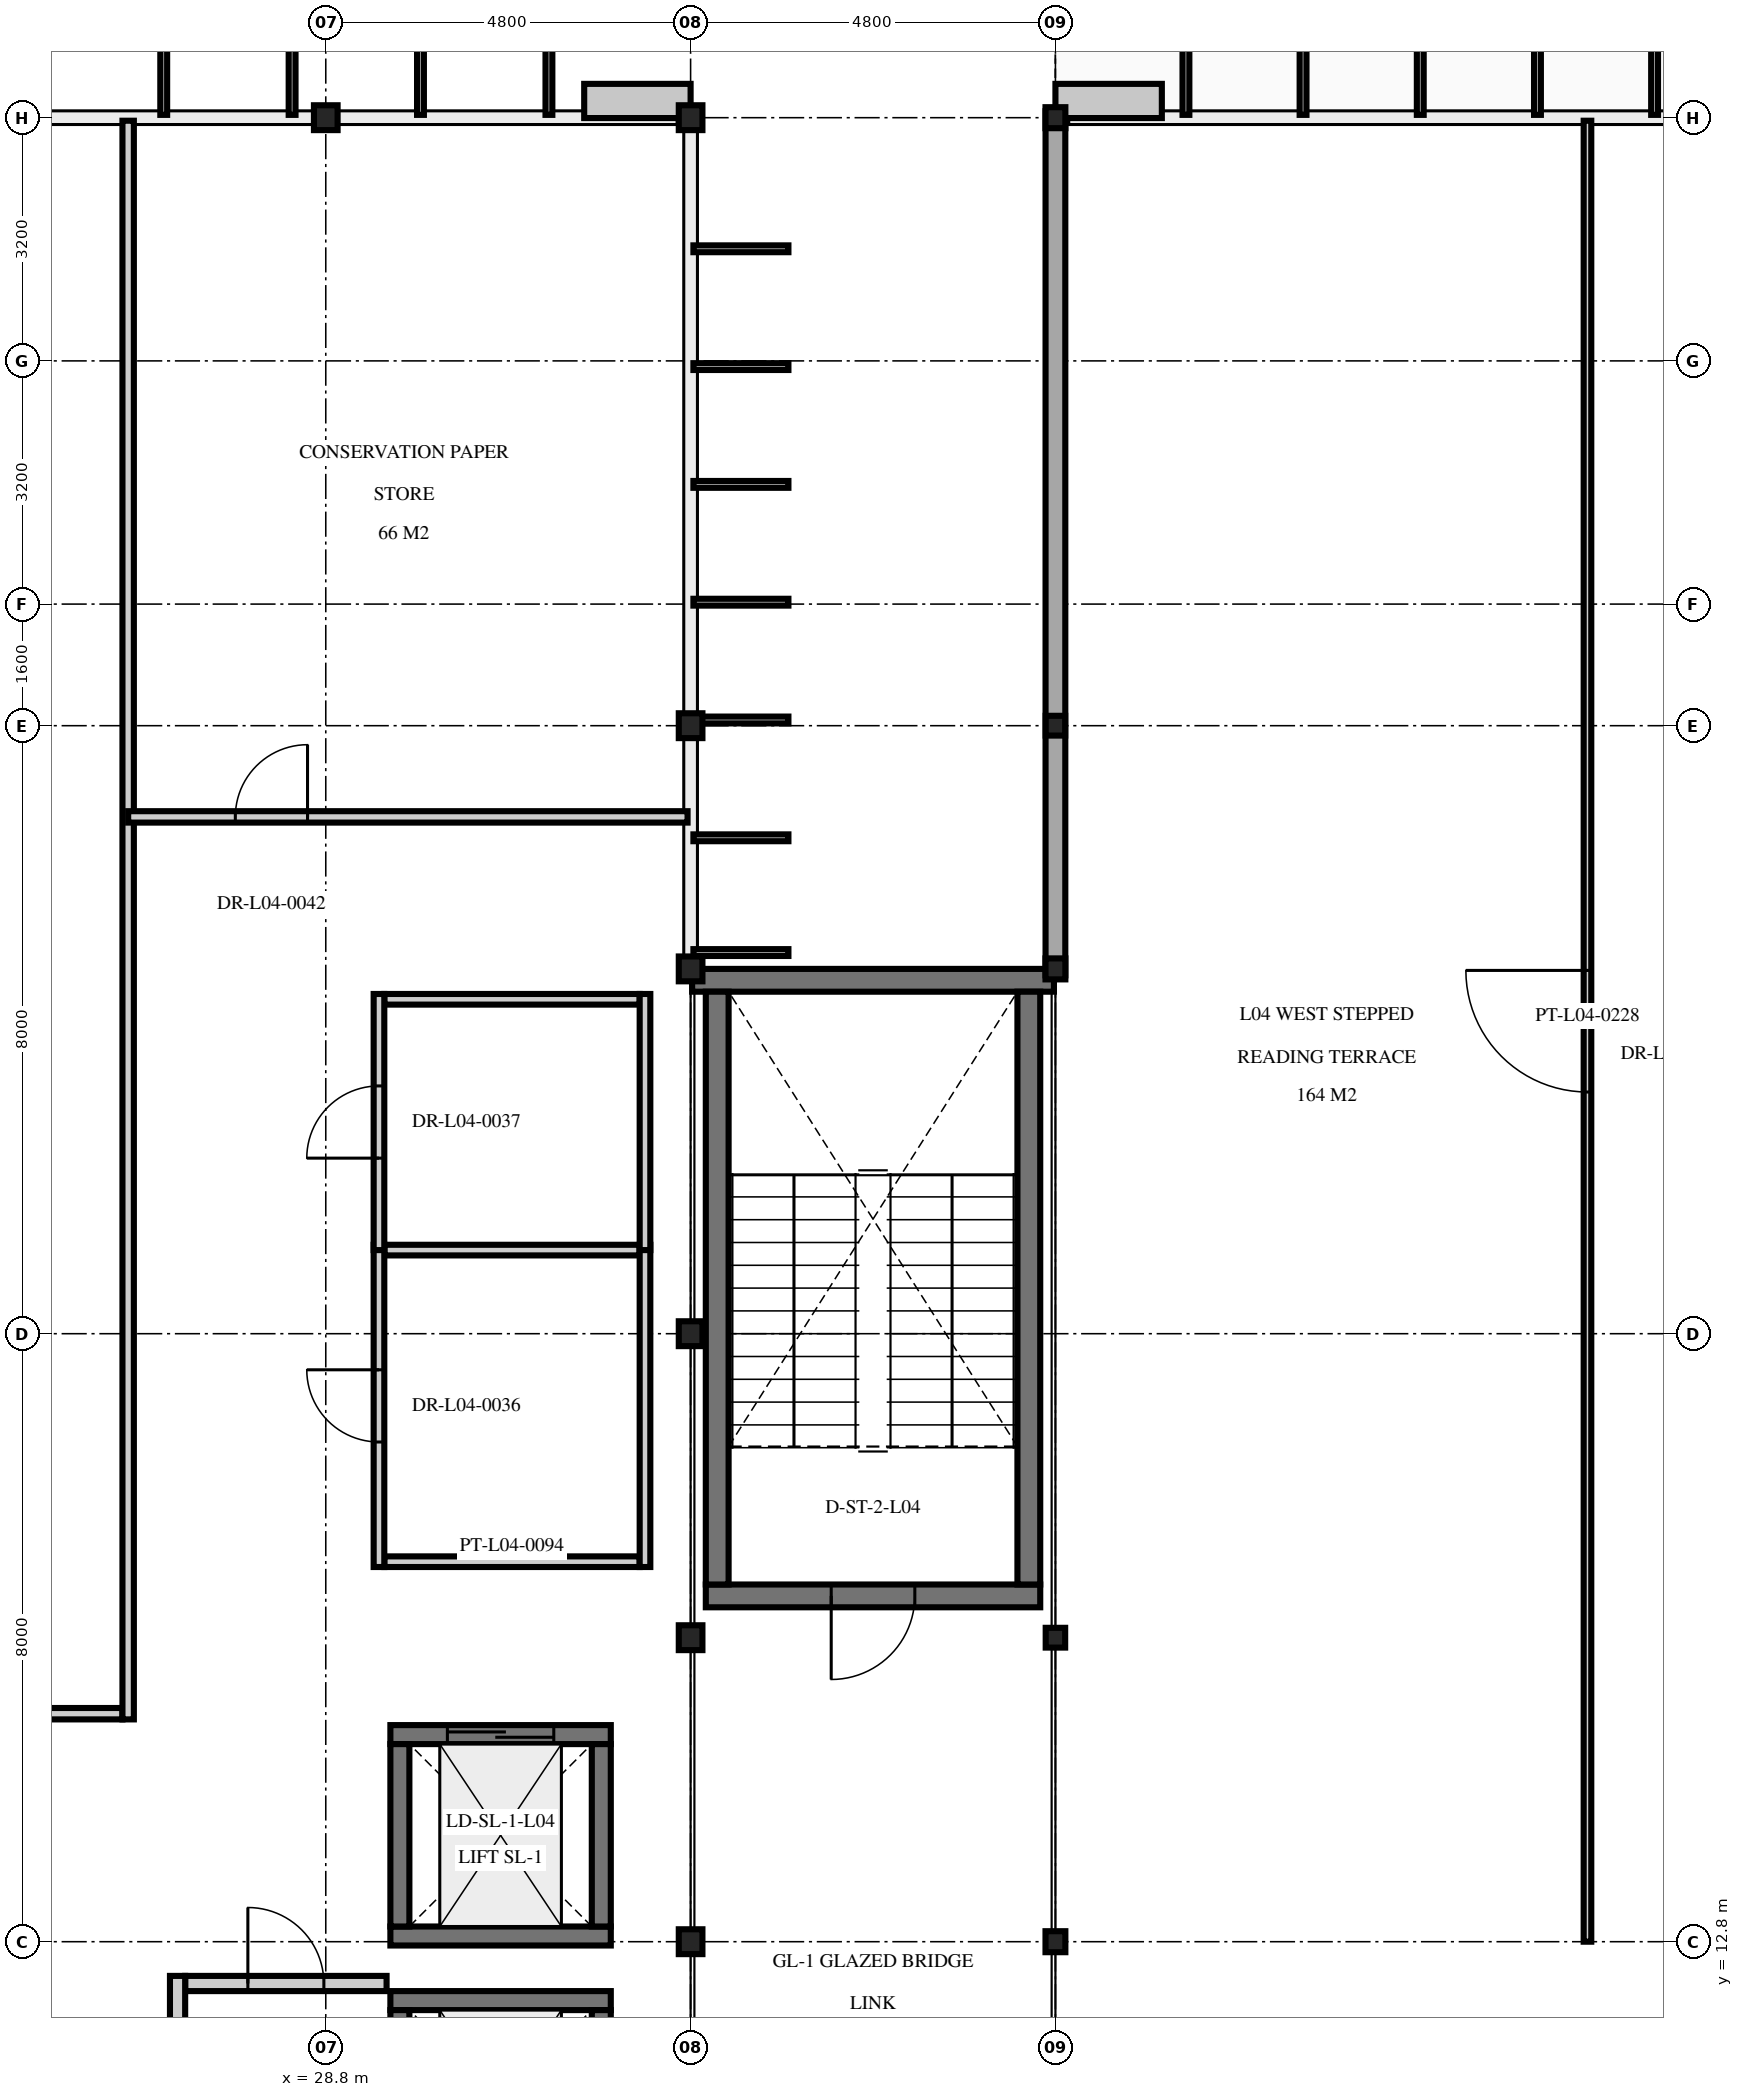
"""IFC4 building model, lengths in metres.
Left out: names, types, materials, properties, quantities, classifications, styles, units other than length and angle.
Written with IfcOpenShell. Run it as: python <this file> out.ifc"""

import sys

from ifc_helpers import new_model, si_unit, direction, frame, frame_2d, origin, origin_2d, place, context, subcontext, project, spatial, rectangle, i_section, extrude, element, fill, save


model = new_model("IFC4")
c1 = context("Model", 3, precision=1e-05, world=origin(), true_north=direction((0.0, 1.0)))
c2 = subcontext(c1, "Body", "Model", "MODEL_VIEW")
j1 = project(units=[si_unit("LENGTHUNIT", "METRE"), si_unit("PLANEANGLEUNIT", "RADIAN")], contexts=[c1])
p1 = place(None, origin())
s1 = spatial("IfcSite", under=j1, at=p1, CompositionType="ELEMENT")
p2 = place(p1, origin())
s2 = spatial("IfcBuilding", under=s1, at=p2, CompositionType="ELEMENT")
p3 = place(p2, frame((0.0, 0.0, 18.6)))
s3 = spatial("IfcBuildingStorey", under=s2, at=p3, CompositionType="ELEMENT", Elevation=18.6)
for number, where, z_axis, x_axis in (
    (1, (28.8, 36.8, 0.0), (0.0, 0.0, 1.0), (1.0, 0.0, 0.0)),
    (2, (33.6, 36.8, 0.0), (0.0, 0.0, 1.0), (1.0, 0.0, 0.0)),
    (3, (33.6, 12.8, 0.0), (0.0, 0.0, 1.0), (1.0, 0.0, 0.0)),
    (4, (33.6, 16.8, 0.0), (0.0, 0.0, 1.0), (1.0, 0.0, 0.0)),
    (5, (33.6, 20.8, 0.0), (0.0, 0.0, 1.0), (1.0, 0.0, 0.0)),
    (6, (33.6, 25.6, 0.0), (0.0, 0.0, 1.0), (1.0, 0.0, 0.0)),
    (7, (33.6, 28.8, 0.0), (0.0, 0.0, 1.0), (1.0, 0.0, 0.0)),
):
    element("IfcColumn", number, at=place(p3, frame(where, z_axis=z_axis, x_axis=x_axis)), inside=s3, PredefinedType="COLUMN", context=c2, shape_type="SweptSolid", body=[
        extrude(i_section(OverallWidth=0.311, OverallDepth=0.327, WebThickness=0.016, FlangeThickness=0.025, at=origin_2d()), origin(), (0.0, 0.0, 1.0), 4.5),
    ])
for number, where, z_axis, x_axis in (
    (8, (38.4, 12.8, 0.0), (0.0, 0.0, 1.0), (1.0, 0.0, 0.0)),
    (9, (38.4, 25.6, 0.0), (0.0, 0.0, 1.0), (1.0, 0.0, 0.0)),
    (10, (38.4, 36.8, 0.0), (0.0, 0.0, 1.0), (1.0, 0.0, 0.0)),
):
    element("IfcColumn", number, at=place(p3, frame(where, z_axis=z_axis, x_axis=x_axis)), inside=s3, PredefinedType="COLUMN", context=c2, shape_type="SweptSolid", body=[
        extrude(i_section(OverallWidth=0.261, OverallDepth=0.276, WebThickness=0.015, FlangeThickness=0.025, at=origin_2d()), origin(), (0.0, 0.0, 1.0), 4.5),
    ])
for number, where, z_axis, x_axis in (
    (11, (38.4, 28.8, 0.0), (0.0, 0.0, 1.0), (1.0, 0.0, 0.0)),
    (12, (38.4, 16.8, 0.0), (0.0, 0.0, 1.0), (1.0, 0.0, 0.0)),
):
    element("IfcColumn", number, at=place(p3, frame(where, z_axis=z_axis, x_axis=x_axis)), inside=s3, PredefinedType="COLUMN", context=c2, shape_type="SweptSolid", body=[
        extrude(i_section(OverallWidth=0.256, OverallDepth=0.26, WebThickness=0.01, FlangeThickness=0.017, at=origin_2d()), origin(), (0.0, 0.0, 1.0), 4.5),
    ])
p4 = place(p3, frame((38.2, 17.35, 0.0), z_axis=(0.0, 0.0, 1.0), x_axis=(-1.0, 0.0, 0.0)))
e13 = element("IfcWall", 13, at=p4, inside=s3, PredefinedType="SHEAR", context=c2, shape_type="SweptSolid", body=[
    extrude(rectangle(XDim=4.4, YDim=0.3, at=frame_2d((2.2, 0.0))), origin(), (0.0, 0.0, 1.0), 4.28),
])
p5 = place(p4, frame((1.65, 0.0, 0.0)))
e14 = element("IfcOpeningElement", 14, at=p5, cuts=e13, PredefinedType="OPENING", context=c2, shape_type="SweptSolid", body=[
    extrude(rectangle(XDim=1.1, YDim=2.2, at=frame_2d((0.55, 1.1))), frame((0.0, 0.16, 0.0), z_axis=(0.0, -1.0, 0.0), x_axis=(1.0, 0.0, 0.0)), (0.0, 0.0, 1.0), 0.32),
])
p6 = place(p3, frame((33.62, 25.45, 0.0), z_axis=(0.0, 0.0, 1.0), x_axis=(1.0, 0.0, 0.0)))
e15 = element("IfcWall", 15, at=p6, inside=s3, PredefinedType="SHEAR", context=c2, shape_type="SweptSolid", body=[
    extrude(rectangle(XDim=4.76, YDim=0.3, at=frame_2d((2.38, 0.0))), origin(), (0.0, 0.0, 1.0), 4.28),
])
for number, where, z_axis, x_axis in (
    (16, (33.95, 17.5, 0.0), (0.0, 0.0, 1.0), (0.0, 1.0, 0.0)),
    (17, (38.05, 25.3, 0.0), (0.0, 0.0, 1.0), (0.0, -1.0, 0.0)),
):
    element("IfcWall", number, at=place(p3, frame(where, z_axis=z_axis, x_axis=x_axis)), inside=s3, PredefinedType="SHEAR", context=c2, shape_type="SweptSolid", body=[
        extrude(rectangle(XDim=7.8, YDim=0.3, at=frame_2d((3.9, 0.0))), origin(), (0.0, 0.0, 1.0), 4.28),
    ])
p7 = place(p3, frame((29.65, 12.025, 0.0), z_axis=(0.0, 0.0, 1.0), x_axis=(1.0, 0.0, 0.0)))
e18 = element("IfcWall", 18, at=p7, inside=s3, PredefinedType="SHEAR", context=c2, shape_type="SweptSolid", body=[
    extrude(rectangle(XDim=2.9, YDim=0.25, at=frame_2d((1.45, 0.0))), origin(), (0.0, 0.0, 1.0), 4.28),
])
p8 = place(p3, frame((29.775, 9.5, 0.0), z_axis=(0.0, 0.0, 1.0), x_axis=(0.0, 1.0, 0.0)))
e19 = element("IfcWall", 19, at=p8, inside=s3, PredefinedType="SHEAR", context=c2, shape_type="SweptSolid", body=[
    extrude(rectangle(XDim=2.4, YDim=0.25, at=frame_2d((1.2, 0.0))), origin(), (0.0, 0.0, 1.0), 4.28),
])
p9 = place(p8, frame((0.5, 0.0, 0.0)))
e20 = element("IfcOpeningElement", 20, at=p9, cuts=e19, PredefinedType="OPENING", context=c2, shape_type="SweptSolid", body=[
    extrude(rectangle(XDim=1.4, YDim=2.2, at=frame_2d((0.7, 1.1))), frame((0.0, 0.135, 0.0), z_axis=(0.0, -1.0, 0.0), x_axis=(1.0, 0.0, 0.0)), (0.0, 0.0, 1.0), 0.27),
])
p10 = place(p3, frame((32.425, 11.9, 0.0), z_axis=(0.0, 0.0, 1.0), x_axis=(0.0, -1.0, 0.0)))
e21 = element("IfcWall", 21, at=p10, inside=s3, PredefinedType="SHEAR", context=c2, shape_type="SweptSolid", body=[
    extrude(rectangle(XDim=2.4, YDim=0.25, at=frame_2d((1.2, 0.0))), origin(), (0.0, 0.0, 1.0), 4.28),
])
p11 = place(p3, frame((32.55, 12.875, 0.0), z_axis=(0.0, 0.0, 1.0), x_axis=(-1.0, 0.0, 0.0)))
e22 = element("IfcWall", 22, at=p11, inside=s3, PredefinedType="SHEAR", context=c2, shape_type="SweptSolid", body=[
    extrude(rectangle(XDim=2.9, YDim=0.25, at=frame_2d((1.45, 0.0))), origin(), (0.0, 0.0, 1.0), 4.28),
])
p12 = place(p3, frame((29.65, 15.525, 0.0), z_axis=(0.0, 0.0, 1.0), x_axis=(1.0, 0.0, 0.0)))
e23 = element("IfcWall", 23, at=p12, inside=s3, PredefinedType="SHEAR", context=c2, shape_type="SweptSolid", body=[
    extrude(rectangle(XDim=2.9, YDim=0.25, at=frame_2d((1.45, 0.0))), origin(), (0.0, 0.0, 1.0), 4.28),
])
p13 = place(p12, frame((0.75, 0.0, 0.0)))
e24 = element("IfcOpeningElement", 24, at=p13, cuts=e23, PredefinedType="OPENING", context=c2, shape_type="SweptSolid", body=[
    extrude(rectangle(XDim=1.4, YDim=2.2, at=frame_2d((0.7, 1.1))), frame((0.0, 0.135, 0.0), z_axis=(0.0, -1.0, 0.0), x_axis=(1.0, 0.0, 0.0)), (0.0, 0.0, 1.0), 0.27),
])
for number, where, z_axis, x_axis in (
    (25, (29.775, 13.0, 0.0), (0.0, 0.0, 1.0), (0.0, 1.0, 0.0)),
    (26, (32.425, 15.4, 0.0), (0.0, 0.0, 1.0), (0.0, -1.0, 0.0)),
):
    element("IfcWall", number, at=place(p3, frame(where, z_axis=z_axis, x_axis=x_axis)), inside=s3, PredefinedType="SHEAR", context=c2, shape_type="SweptSolid", body=[
        extrude(rectangle(XDim=2.4, YDim=0.25, at=frame_2d((1.2, 0.0))), origin(), (0.0, 0.0, 1.0), 4.28),
    ])
p14 = place(p3, frame((38.4, 25.515, 0.0), z_axis=(0.0, 0.0, 1.0), x_axis=(0.0, 1.0, 0.0)))
e27 = element("IfcWall", 27, at=p14, inside=s3, PredefinedType="SOLIDWALL", context=c2, shape_type="SweptSolid", body=[
    extrude(rectangle(XDim=11.37, YDim=0.26, at=frame_2d((5.685, 0.0))), origin(), (0.0, 0.0, 1.0), 3.855),
])
p15 = place(p3, frame((26.95, 12.25, 0.0), z_axis=(0.0, 0.0, 1.0), x_axis=(1.0, 0.0, 0.0)))
e28 = element("IfcWall", 28, at=p15, inside=s3, PredefinedType="PARTITIONING", context=c2, shape_type="SweptSolid", body=[
    extrude(rectangle(XDim=2.65, YDim=0.2, at=frame_2d((1.325, 0.0))), origin(), (0.0, 0.0, 1.0), 4.28),
])
p16 = place(p15, frame((0.825, 0.0, 0.0)))
e29 = element("IfcOpeningElement", 29, at=p16, cuts=e28, PredefinedType="OPENING", context=c2, shape_type="SweptSolid", body=[
    extrude(rectangle(XDim=1.0, YDim=2.2, at=frame_2d((0.5, 1.1))), frame((0.0, 0.11, 0.0), z_axis=(0.0, -1.0, 0.0), x_axis=(1.0, 0.0, 0.0)), (0.0, 0.0, 1.0), 0.22),
])
p17 = place(p3, frame((26.85, 9.25, 0.0), z_axis=(0.0, 0.0, 1.0), x_axis=(0.0, 1.0, 0.0)))
e30 = element("IfcWall", 30, at=p17, inside=s3, PredefinedType="PARTITIONING", context=c2, shape_type="SweptSolid", body=[
    extrude(rectangle(XDim=3.1, YDim=0.2, at=frame_2d((1.55, 0.0))), origin(), (0.0, 0.0, 1.0), 4.28),
])
for number, where, z_axis, x_axis in (
    (31, (29.57, 17.8, 0.0), (0.0, 0.0, 1.0), (1.0, 0.0, 0.0)),
    (32, (29.57, 21.9, 0.0), (0.0, 0.0, 1.0), (1.0, 0.0, 0.0)),
):
    element("IfcWall", number, at=place(p3, frame(where, z_axis=z_axis, x_axis=x_axis)), inside=s3, PredefinedType="PARTITIONING", context=c2, shape_type="SweptSolid", body=[
        extrude(rectangle(XDim=3.36, YDim=0.14, at=frame_2d((1.68, 0.0))), origin(), (0.0, 0.0, 1.0), 4.015),
    ])
p18 = place(p3, frame((29.5, 17.73, 0.0), z_axis=(0.0, 0.0, 1.0), x_axis=(0.0, 1.0, 0.0)))
e33 = element("IfcWall", 33, at=p18, inside=s3, PredefinedType="PARTITIONING", context=c2, shape_type="SweptSolid", body=[
    extrude(rectangle(XDim=4.24, YDim=0.14, at=frame_2d((2.12, 0.0))), origin(), (0.0, 0.0, 1.0), 3.665),
])
p19 = place(p18, frame((1.645, 0.0, 0.0)))
e34 = element("IfcOpeningElement", 34, at=p19, cuts=e33, PredefinedType="OPENING", context=c2, shape_type="SweptSolid", body=[
    extrude(rectangle(XDim=0.95, YDim=2.1, at=frame_2d((0.475, 1.05))), frame((0.0, 0.08, 0.0), z_axis=(0.0, -1.0, 0.0), x_axis=(1.0, 0.0, 0.0)), (0.0, 0.0, 1.0), 0.16),
])
p20 = place(p3, frame((33.0, 17.73, 0.0), z_axis=(0.0, 0.0, 1.0), x_axis=(0.0, 1.0, 0.0)))
e35 = element("IfcWall", 35, at=p20, inside=s3, PredefinedType="PARTITIONING", context=c2, shape_type="SweptSolid", body=[
    extrude(rectangle(XDim=4.24, YDim=0.14, at=frame_2d((2.12, 0.0))), origin(), (0.0, 0.0, 1.0), 3.665),
])
p21 = place(p3, frame((29.57, 25.2, 0.0), z_axis=(0.0, 0.0, 1.0), x_axis=(1.0, 0.0, 0.0)))
e36 = element("IfcWall", 36, at=p21, inside=s3, PredefinedType="PARTITIONING", context=c2, shape_type="SweptSolid", body=[
    extrude(rectangle(XDim=3.36, YDim=0.14, at=frame_2d((1.68, 0.0))), origin(), (0.0, 0.0, 1.0), 4.015),
])
p22 = place(p3, frame((29.5, 21.9, 0.0), z_axis=(0.0, 0.0, 1.0), x_axis=(0.0, 1.0, 0.0)))
e37 = element("IfcWall", 37, at=p22, inside=s3, PredefinedType="PARTITIONING", context=c2, shape_type="SweptSolid", body=[
    extrude(rectangle(XDim=3.37, YDim=0.14, at=frame_2d((1.685, 0.0))), origin(), (0.0, 0.0, 1.0), 4.28),
])
p23 = place(p22, frame((1.21, 0.0, 0.0)))
e38 = element("IfcOpeningElement", 38, at=p23, cuts=e37, PredefinedType="OPENING", context=c2, shape_type="SweptSolid", body=[
    extrude(rectangle(XDim=0.95, YDim=2.1, at=frame_2d((0.475, 1.05))), frame((0.0, 0.08, 0.0), z_axis=(0.0, -1.0, 0.0), x_axis=(1.0, 0.0, 0.0)), (0.0, 0.0, 1.0), 0.16),
])
p24 = place(p3, frame((33.0, 21.9, 0.0), z_axis=(0.0, 0.0, 1.0), x_axis=(0.0, 1.0, 0.0)))
e39 = element("IfcWall", 39, at=p24, inside=s3, PredefinedType="PARTITIONING", context=c2, shape_type="SweptSolid", body=[
    extrude(rectangle(XDim=3.37, YDim=0.14, at=frame_2d((1.685, 0.0))), origin(), (0.0, 0.0, 1.0), 4.28),
])
p25 = place(p3, frame((9.675, 15.8, 0.0), z_axis=(0.0, 0.0, 1.0), x_axis=(1.0, 0.0, 0.0)))
e40 = element("IfcWall", 40, at=p25, inside=s3, PredefinedType="PARTITIONING", context=c2, shape_type="SweptSolid", body=[
    extrude(rectangle(XDim=16.45, YDim=0.15, at=frame_2d((8.225, 0.0))), origin(), (0.0, 0.0, 1.0), 3.711),
])
p26 = place(p3, frame((26.2, 15.725, 0.0), z_axis=(0.0, 0.0, 1.0), x_axis=(0.0, 1.0, 0.0)))
e41 = element("IfcWall", 41, at=p26, inside=s3, PredefinedType="PARTITIONING", context=c2, shape_type="SweptSolid", body=[
    extrude(rectangle(XDim=21.035, YDim=0.15, at=frame_2d((10.518, 0.0))), origin(), (0.0, 0.0, 1.0), 3.665),
])
p27 = place(p3, frame((26.2, 27.6, 0.0), z_axis=(0.0, 0.0, 1.0), x_axis=(1.0, 0.0, 0.0)))
e42 = element("IfcWall", 42, at=p27, inside=s3, PredefinedType="PARTITIONING", context=c2, shape_type="SweptSolid", body=[
    extrude(rectangle(XDim=7.36, YDim=0.15, at=frame_2d((3.68, 0.0))), origin(), (0.0, 0.0, 1.0), 3.711),
])
p28 = place(p27, frame((1.41, 0.0, 0.0)))
e43 = element("IfcOpeningElement", 43, at=p28, cuts=e42, PredefinedType="OPENING", context=c2, shape_type="SweptSolid", body=[
    extrude(rectangle(XDim=0.95, YDim=2.15, at=frame_2d((0.475, 1.075))), frame((0.0, 0.085, 0.0), z_axis=(0.0, -1.0, 0.0), x_axis=(1.0, 0.0, 0.0)), (0.0, 0.0, 1.0), 0.17),
])
p29 = place(p3, frame((45.4, 12.8, 0.0), z_axis=(0.0, 0.0, 1.0), x_axis=(0.0, 1.0, 0.0)))
e44 = element("IfcWall", 44, at=p29, inside=s3, PredefinedType="MOVABLE", context=c2, shape_type="SweptSolid", body=[
    extrude(rectangle(XDim=23.96, YDim=0.1, at=frame_2d((11.98, 0.0))), origin(), (0.0, 0.0, 1.0), 3.855),
])
p30 = place(p29, frame((11.18, 0.0, 0.0)))
e45 = element("IfcOpeningElement", 45, at=p30, cuts=e44, PredefinedType="OPENING", context=c2, shape_type="SweptSolid", body=[
    extrude(rectangle(XDim=1.6, YDim=2.25, at=frame_2d((0.8, 1.125))), frame((0.0, 0.06, 0.0), z_axis=(0.0, -1.0, 0.0), x_axis=(1.0, 0.0, 0.0)), (0.0, 0.0, 1.0), 0.12),
])
p31 = place(p5, origin())
e46 = element("IfcDoor", 46, at=p31, inside=s3, OperationType="SINGLE_SWING_RIGHT", PredefinedType="DOOR", context=c2, shape_type="SweptSolid", body=[
    extrude(rectangle(XDim=1.1, YDim=2.2, at=frame_2d((0.55, 1.1))), frame((0.0, 0.025, 0.0), z_axis=(0.0, -1.0, 0.0), x_axis=(1.0, 0.0, 0.0)), (0.0, 0.0, 1.0), 0.05),
])
fill(e14, e46)
p32 = place(p13, origin())
e47 = element("IfcDoor", 47, at=p32, inside=s3, OperationType="DOUBLE_DOOR_SLIDING", PredefinedType="DOOR", context=c2, shape_type="SweptSolid", body=[
    extrude(rectangle(XDim=1.4, YDim=2.2, at=frame_2d((0.7, 1.1))), frame((0.0, 0.025, 0.0), z_axis=(0.0, -1.0, 0.0), x_axis=(1.0, 0.0, 0.0)), (0.0, 0.0, 1.0), 0.05),
])
fill(e24, e47)
p33 = place(p16, origin())
e48 = element("IfcDoor", 48, at=p33, inside=s3, OperationType="SINGLE_SWING_LEFT", PredefinedType="DOOR", context=c2, shape_type="SweptSolid", body=[
    extrude(rectangle(XDim=1.0, YDim=2.2, at=frame_2d((0.5, 1.1))), frame((0.0, 0.025, 0.0), z_axis=(0.0, -1.0, 0.0), x_axis=(1.0, 0.0, 0.0)), (0.0, 0.0, 1.0), 0.05),
])
fill(e29, e48)
p34 = place(p19, origin())
e49 = element("IfcDoor", 49, at=p34, inside=s3, OperationType="SINGLE_SWING_RIGHT", PredefinedType="DOOR", context=c2, shape_type="SweptSolid", body=[
    extrude(rectangle(XDim=0.95, YDim=2.1, at=frame_2d((0.475, 1.05))), frame((0.0, 0.025, 0.0), z_axis=(0.0, -1.0, 0.0), x_axis=(1.0, 0.0, 0.0)), (0.0, 0.0, 1.0), 0.05),
])
fill(e34, e49)
p35 = place(p23, origin())
e50 = element("IfcDoor", 50, at=p35, inside=s3, OperationType="SINGLE_SWING_LEFT", PredefinedType="DOOR", context=c2, shape_type="SweptSolid", body=[
    extrude(rectangle(XDim=0.95, YDim=2.1, at=frame_2d((0.475, 1.05))), frame((0.0, 0.025, 0.0), z_axis=(0.0, -1.0, 0.0), x_axis=(1.0, 0.0, 0.0)), (0.0, 0.0, 1.0), 0.05),
])
fill(e38, e50)
p36 = place(p28, origin())
e51 = element("IfcDoor", 51, at=p36, inside=s3, OperationType="SINGLE_SWING_RIGHT", PredefinedType="DOOR", context=c2, shape_type="SweptSolid", body=[
    extrude(rectangle(XDim=0.95, YDim=2.15, at=frame_2d((0.475, 1.075))), frame((0.0, 0.025, 0.0), z_axis=(0.0, -1.0, 0.0), x_axis=(1.0, 0.0, 0.0)), (0.0, 0.0, 1.0), 0.05),
])
fill(e43, e51)
p37 = place(p30, origin())
e52 = element("IfcDoor", 52, at=p37, inside=s3, OperationType="DOUBLE_DOOR_SINGLE_SWING", PredefinedType="DOOR", context=c2, shape_type="SweptSolid", body=[
    extrude(rectangle(XDim=1.6, YDim=2.25, at=frame_2d((0.8, 1.125))), frame((0.0, 0.025, 0.0), z_axis=(0.0, -1.0, 0.0), x_axis=(1.0, 0.0, 0.0)), (0.0, 0.0, 1.0), 0.05),
])
fill(e45, e52)
save(model, sys.argv[1])
